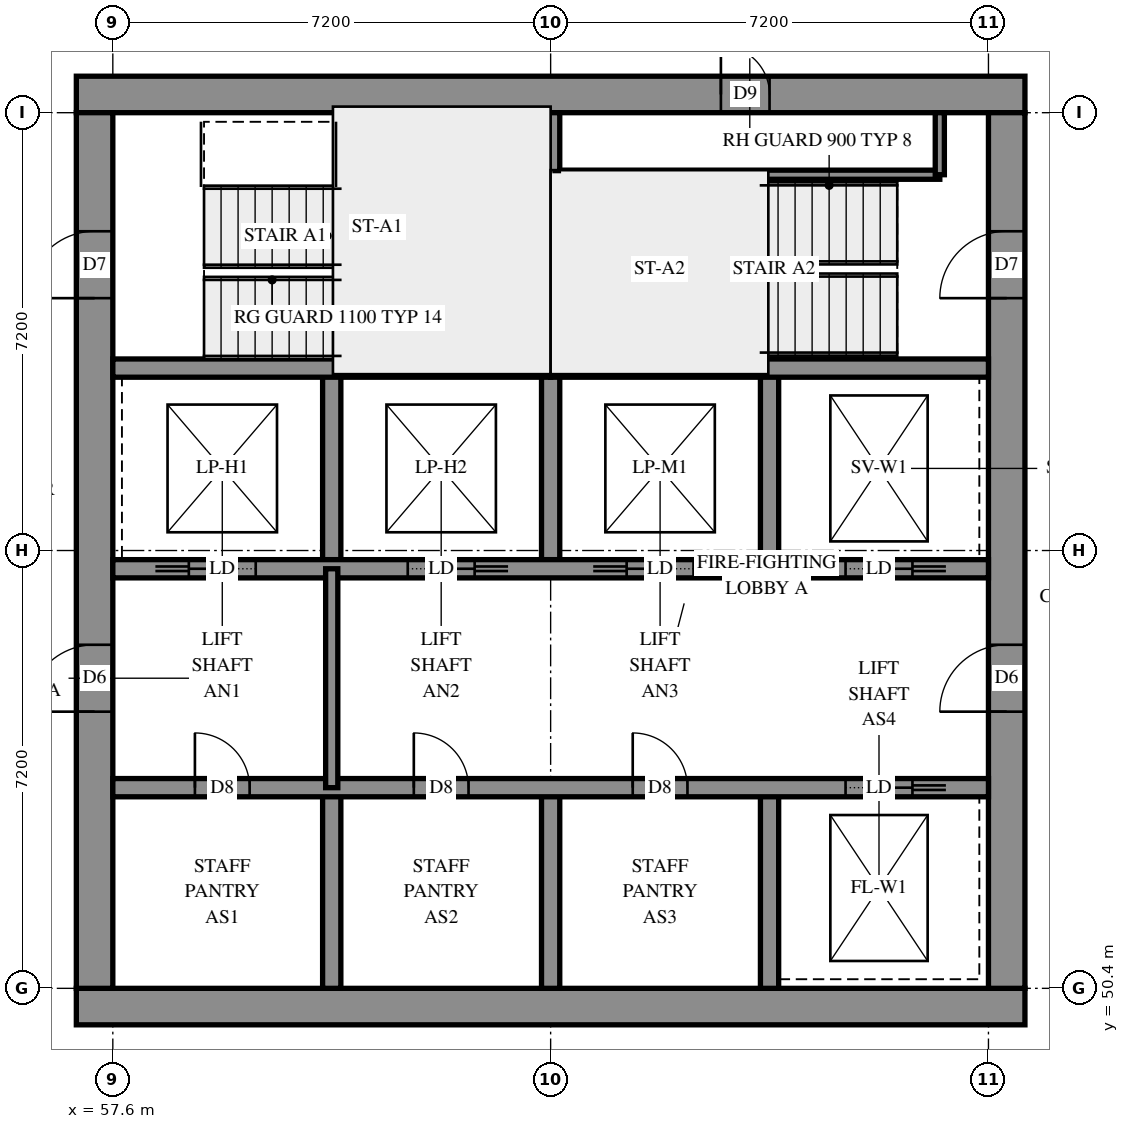
"""IFC4 building model, lengths in metres.
Left out: names, types, materials, properties, quantities, classifications, styles, units other than length and angle.
Written with IfcOpenShell. Run it as: python <this file> out.ifc"""

import sys

from ifc_helpers import new_model, si_unit, direction, frame, frame_2d, origin, place, context, subcontext, project, spatial, rectangle, extrude, element, fill, save


model = new_model("IFC4")
c1 = context("Model", 3, precision=1e-05, world=origin(), true_north=direction((0.0, 1.0)))
c2 = subcontext(c1, "Body", "Model", "MODEL_VIEW")
j1 = project(units=[si_unit("LENGTHUNIT", "METRE"), si_unit("PLANEANGLEUNIT", "RADIAN")], contexts=[c1])
p1 = place(None, origin())
s1 = spatial("IfcSite", under=j1, at=p1, CompositionType="ELEMENT")
p2 = place(p1, origin())
s2 = spatial("IfcBuilding", under=s1, at=p2, CompositionType="ELEMENT")
p3 = place(p2, frame((0.0, 0.0, 162.6)))
s3 = spatial("IfcBuildingStorey", under=s2, at=p3, CompositionType="ELEMENT", Elevation=162.6)
p4 = place(p3, frame((57.0, 50.1, -0.3), z_axis=(0.0, 0.0, 1.0), x_axis=(1.0, 0.0, 0.0)))
e1 = element("IfcWall", 1, at=p4, inside=s3, PredefinedType="SHEAR", context=c2, shape_type="SweptSolid", body=[
    extrude(rectangle(XDim=15.6, YDim=0.6, at=frame_2d((7.8, 0.0))), origin(), (0.0, 0.0, 1.0), 2.7),
])
p5 = place(p3, frame((57.0, 65.1, -0.3), z_axis=(0.0, 0.0, 1.0), x_axis=(1.0, 0.0, 0.0)))
e2 = element("IfcWall", 2, at=p5, inside=s3, PredefinedType="SHEAR", context=c2, shape_type="SweptSolid", body=[
    extrude(rectangle(XDim=15.6, YDim=0.6, at=frame_2d((7.8, 0.0))), origin(), (0.0, 0.0, 1.0), 2.7),
])
p6 = place(p5, frame((10.6, 0.0, 0.3)))
e3 = element("IfcOpeningElement", 3, at=p6, cuts=e2, PredefinedType="OPENING", context=c2, shape_type="SweptSolid", body=[
    extrude(rectangle(XDim=0.8, YDim=2.1, at=frame_2d((0.4, 1.05))), frame((0.0, 0.31, 0.0), z_axis=(0.0, -1.0, 0.0), x_axis=(1.0, 0.0, 0.0)), (0.0, 0.0, 1.0), 0.62),
])
p7 = place(p3, frame((57.3, 50.4, -0.3), z_axis=(0.0, 0.0, 1.0), x_axis=(0.0, 1.0, 0.0)))
e4 = element("IfcWall", 4, at=p7, inside=s3, PredefinedType="SHEAR", context=c2, shape_type="SweptSolid", body=[
    extrude(rectangle(XDim=14.4, YDim=0.6, at=frame_2d((7.2, 0.0))), origin(), (0.0, 0.0, 1.0), 2.7),
])
p8 = place(p7, frame((4.55, 0.0, 0.3)))
e5 = element("IfcOpeningElement", 5, at=p8, cuts=e4, PredefinedType="OPENING", context=c2, shape_type="SweptSolid", body=[
    extrude(rectangle(XDim=1.1, YDim=2.1, at=frame_2d((0.55, 1.05))), frame((0.0, 0.31, 0.0), z_axis=(0.0, -1.0, 0.0), x_axis=(1.0, 0.0, 0.0)), (0.0, 0.0, 1.0), 0.62),
])
p9 = place(p7, frame((11.35, 0.0, 0.3)))
e6 = element("IfcOpeningElement", 6, at=p9, cuts=e4, PredefinedType="OPENING", context=c2, shape_type="SweptSolid", body=[
    extrude(rectangle(XDim=1.1, YDim=2.1, at=frame_2d((0.55, 1.05))), frame((0.0, 0.31, 0.0), z_axis=(0.0, -1.0, 0.0), x_axis=(1.0, 0.0, 0.0)), (0.0, 0.0, 1.0), 0.62),
])
p10 = place(p3, frame((72.3, 50.4, -0.3), z_axis=(0.0, 0.0, 1.0), x_axis=(0.0, 1.0, 0.0)))
e7 = element("IfcWall", 7, at=p10, inside=s3, PredefinedType="SHEAR", context=c2, shape_type="SweptSolid", body=[
    extrude(rectangle(XDim=14.4, YDim=0.6, at=frame_2d((7.2, 0.0))), origin(), (0.0, 0.0, 1.0), 2.7),
])
p11 = place(p10, frame((4.55, 0.0, 0.3)))
e8 = element("IfcOpeningElement", 8, at=p11, cuts=e7, PredefinedType="OPENING", context=c2, shape_type="SweptSolid", body=[
    extrude(rectangle(XDim=1.1, YDim=2.1, at=frame_2d((0.55, 1.05))), frame((0.0, 0.31, 0.0), z_axis=(0.0, -1.0, 0.0), x_axis=(1.0, 0.0, 0.0)), (0.0, 0.0, 1.0), 0.62),
])
p12 = place(p10, frame((11.35, 0.0, 0.3)))
e9 = element("IfcOpeningElement", 9, at=p12, cuts=e7, PredefinedType="OPENING", context=c2, shape_type="SweptSolid", body=[
    extrude(rectangle(XDim=1.1, YDim=2.1, at=frame_2d((0.55, 1.05))), frame((0.0, 0.31, 0.0), z_axis=(0.0, -1.0, 0.0), x_axis=(1.0, 0.0, 0.0)), (0.0, 0.0, 1.0), 0.62),
])
for number, where, z_axis, x_axis in (
    (10, (61.2, 50.4, 0.0), (0.0, 0.0, 1.0), (0.0, 1.0, 0.0)),
    (11, (61.2, 57.3, 0.0), (0.0, 0.0, 1.0), (0.0, 1.0, 0.0)),
    (12, (64.8, 50.4, 0.0), (0.0, 0.0, 1.0), (0.0, 1.0, 0.0)),
    (13, (64.8, 57.3, 0.0), (0.0, 0.0, 1.0), (0.0, 1.0, 0.0)),
    (14, (68.4, 50.4, 0.0), (0.0, 0.0, 1.0), (0.0, 1.0, 0.0)),
    (15, (68.4, 57.3, 0.0), (0.0, 0.0, 1.0), (0.0, 1.0, 0.0)),
):
    element("IfcWall", number, at=place(p3, frame(where, z_axis=z_axis, x_axis=x_axis)), inside=s3, PredefinedType="SOLIDWALL", context=c2, shape_type="SweptSolid", body=[
        extrude(rectangle(XDim=3.3, YDim=0.3, at=frame_2d((1.65, 0.0))), origin(), (0.0, 0.0, 1.0), 3.1),
    ])
p13 = place(p3, frame((57.6, 53.7, 0.0), z_axis=(0.0, 0.0, 1.0), x_axis=(1.0, 0.0, 0.0)))
e16 = element("IfcWall", 16, at=p13, inside=s3, PredefinedType="SOLIDWALL", context=c2, shape_type="SweptSolid", body=[
    extrude(rectangle(XDim=14.4, YDim=0.3, at=frame_2d((7.2, 0.0))), origin(), (0.0, 0.0, 1.0), 3.1),
])
p14 = place(p13, frame((1.35, 0.0, 0.0)))
e17 = element("IfcOpeningElement", 17, at=p14, cuts=e16, PredefinedType="OPENING", context=c2, shape_type="SweptSolid", body=[
    extrude(rectangle(XDim=0.9, YDim=2.1, at=frame_2d((0.45, 1.05))), frame((0.0, 0.16, 0.0), z_axis=(0.0, -1.0, 0.0), x_axis=(1.0, 0.0, 0.0)), (0.0, 0.0, 1.0), 0.32),
])
p15 = place(p13, frame((4.95, 0.0, 0.0)))
e18 = element("IfcOpeningElement", 18, at=p15, cuts=e16, PredefinedType="OPENING", context=c2, shape_type="SweptSolid", body=[
    extrude(rectangle(XDim=0.9, YDim=2.1, at=frame_2d((0.45, 1.05))), frame((0.0, 0.16, 0.0), z_axis=(0.0, -1.0, 0.0), x_axis=(1.0, 0.0, 0.0)), (0.0, 0.0, 1.0), 0.32),
])
p16 = place(p13, frame((8.55, 0.0, 0.0)))
e19 = element("IfcOpeningElement", 19, at=p16, cuts=e16, PredefinedType="OPENING", context=c2, shape_type="SweptSolid", body=[
    extrude(rectangle(XDim=0.9, YDim=2.1, at=frame_2d((0.45, 1.05))), frame((0.0, 0.16, 0.0), z_axis=(0.0, -1.0, 0.0), x_axis=(1.0, 0.0, 0.0)), (0.0, 0.0, 1.0), 0.32),
])
p17 = place(p13, frame((12.05, 0.0, 0.0)))
e20 = element("IfcOpeningElement", 20, at=p17, cuts=e16, PredefinedType="OPENING", context=c2, shape_type="SweptSolid", body=[
    extrude(rectangle(XDim=1.1, YDim=2.1, at=frame_2d((0.55, 1.05))), frame((0.0, 0.16, 0.0), z_axis=(0.0, -1.0, 0.0), x_axis=(1.0, 0.0, 0.0)), (0.0, 0.0, 1.0), 0.32),
])
p18 = place(p3, frame((57.6, 57.3, 0.0), z_axis=(0.0, 0.0, 1.0), x_axis=(1.0, 0.0, 0.0)))
e21 = element("IfcWall", 21, at=p18, inside=s3, PredefinedType="SOLIDWALL", context=c2, shape_type="SweptSolid", body=[
    extrude(rectangle(XDim=14.4, YDim=0.3, at=frame_2d((7.2, 0.0))), origin(), (0.0, 0.0, 1.0), 3.1),
])
p19 = place(p18, frame((1.25, 0.0, 0.0)))
e22 = element("IfcOpeningElement", 22, at=p19, cuts=e21, PredefinedType="OPENING", context=c2, shape_type="SweptSolid", body=[
    extrude(rectangle(XDim=1.1, YDim=2.1, at=frame_2d((0.55, 1.05))), frame((0.0, 0.16, 0.0), z_axis=(0.0, -1.0, 0.0), x_axis=(1.0, 0.0, 0.0)), (0.0, 0.0, 1.0), 0.32),
])
p20 = place(p18, frame((4.85, 0.0, 0.0)))
e23 = element("IfcOpeningElement", 23, at=p20, cuts=e21, PredefinedType="OPENING", context=c2, shape_type="SweptSolid", body=[
    extrude(rectangle(XDim=1.1, YDim=2.1, at=frame_2d((0.55, 1.05))), frame((0.0, 0.16, 0.0), z_axis=(0.0, -1.0, 0.0), x_axis=(1.0, 0.0, 0.0)), (0.0, 0.0, 1.0), 0.32),
])
p21 = place(p18, frame((8.45, 0.0, 0.0)))
e24 = element("IfcOpeningElement", 24, at=p21, cuts=e21, PredefinedType="OPENING", context=c2, shape_type="SweptSolid", body=[
    extrude(rectangle(XDim=1.1, YDim=2.1, at=frame_2d((0.55, 1.05))), frame((0.0, 0.16, 0.0), z_axis=(0.0, -1.0, 0.0), x_axis=(1.0, 0.0, 0.0)), (0.0, 0.0, 1.0), 0.32),
])
p22 = place(p18, frame((12.05, 0.0, 0.0)))
e25 = element("IfcOpeningElement", 25, at=p22, cuts=e21, PredefinedType="OPENING", context=c2, shape_type="SweptSolid", body=[
    extrude(rectangle(XDim=1.1, YDim=2.1, at=frame_2d((0.55, 1.05))), frame((0.0, 0.16, 0.0), z_axis=(0.0, -1.0, 0.0), x_axis=(1.0, 0.0, 0.0)), (0.0, 0.0, 1.0), 0.32),
])
for number, where, z_axis, x_axis in (
    (26, (57.6, 60.6, 0.0), (0.0, 0.0, 1.0), (1.0, 0.0, 0.0)),
    (27, (64.8, 60.6, 0.0), (0.0, 0.0, 1.0), (1.0, 0.0, 0.0)),
):
    element("IfcWall", number, at=place(p3, frame(where, z_axis=z_axis, x_axis=x_axis)), inside=s3, PredefinedType="SOLIDWALL", context=c2, shape_type="SweptSolid", body=[
        extrude(rectangle(XDim=7.2, YDim=0.3, at=frame_2d((3.6, 0.0))), origin(), (0.0, 0.0, 1.0), 3.1),
    ])
p23 = place(p3, frame((64.8, 60.6, 0.0), z_axis=(0.0, 0.0, 1.0), x_axis=(0.0, 1.0, 0.0)))
e28 = element("IfcWall", 28, at=p23, inside=s3, PredefinedType="SOLIDWALL", context=c2, shape_type="SweptSolid", body=[
    extrude(rectangle(XDim=4.2, YDim=0.3, at=frame_2d((2.1, 0.0))), origin(), (0.0, 0.0, 1.0), 3.1),
])
p24 = place(p3, frame((64.95, 63.78, 0.0), z_axis=(0.0, 0.0, 1.0), x_axis=(1.0, 0.0, 0.0)))
e29 = element("IfcWall", 29, at=p24, inside=s3, PredefinedType="PARTITIONING", context=c2, shape_type="SweptSolid", body=[
    extrude(rectangle(XDim=6.25, YDim=0.15, at=frame_2d((3.125, 0.0))), origin(), (0.0, 0.0, 1.0), 3.1),
])
p25 = place(p3, frame((71.2, 63.78, 0.0), z_axis=(0.0, 0.0, 1.0), x_axis=(0.0, 1.0, 0.0)))
e30 = element("IfcWall", 30, at=p25, inside=s3, PredefinedType="PARTITIONING", context=c2, shape_type="SweptSolid", body=[
    extrude(rectangle(XDim=1.02, YDim=0.15, at=frame_2d((0.51, 0.0))), origin(), (0.0, 0.0, 1.0), 3.1),
])
p26 = place(p3, frame((61.2, 53.7, 0.0), z_axis=(0.0, 0.0, 1.0), x_axis=(0.0, 1.0, 0.0)))
e31 = element("IfcWall", 31, at=p26, inside=s3, PredefinedType="PARTITIONING", context=c2, shape_type="SweptSolid", body=[
    extrude(rectangle(XDim=3.6, YDim=0.2, at=frame_2d((1.8, 0.0))), origin(), (0.0, 0.0, 1.0), 3.1),
])
p27 = place(p6, origin())
e32 = element("IfcDoor", 32, at=p27, inside=s3, OperationType="SINGLE_SWING_RIGHT", PredefinedType="DOOR", context=c2, shape_type="SweptSolid", body=[
    extrude(rectangle(XDim=0.8, YDim=2.1, at=frame_2d((0.4, 1.05))), frame((0.0, 0.025, 0.0), z_axis=(0.0, -1.0, 0.0), x_axis=(1.0, 0.0, 0.0)), (0.0, 0.0, 1.0), 0.05),
])
fill(e3, e32)
p28 = place(p8, origin())
e33 = element("IfcDoor", 33, at=p28, inside=s3, OperationType="DOUBLE_DOOR_SINGLE_SWING", PredefinedType="DOOR", context=c2, shape_type="SweptSolid", body=[
    extrude(rectangle(XDim=1.1, YDim=2.1, at=frame_2d((0.55, 1.05))), frame((0.0, 0.025, 0.0), z_axis=(0.0, -1.0, 0.0), x_axis=(1.0, 0.0, 0.0)), (0.0, 0.0, 1.0), 0.05),
])
fill(e5, e33)
p29 = place(p11, origin())
e34 = element("IfcDoor", 34, at=p29, inside=s3, OperationType="DOUBLE_DOOR_SINGLE_SWING", PredefinedType="DOOR", context=c2, shape_type="SweptSolid", body=[
    extrude(rectangle(XDim=1.1, YDim=2.1, at=frame_2d((0.55, 1.05))), frame((0.0, 0.025, 0.0), z_axis=(0.0, -1.0, 0.0), x_axis=(1.0, 0.0, 0.0)), (0.0, 0.0, 1.0), 0.05),
])
fill(e8, e34)
p30 = place(p9, origin())
e35 = element("IfcDoor", 35, at=p30, inside=s3, OperationType="SINGLE_SWING_LEFT", PredefinedType="DOOR", context=c2, shape_type="SweptSolid", body=[
    extrude(rectangle(XDim=1.1, YDim=2.1, at=frame_2d((0.55, 1.05))), frame((0.0, 0.025, 0.0), z_axis=(0.0, -1.0, 0.0), x_axis=(1.0, 0.0, 0.0)), (0.0, 0.0, 1.0), 0.05),
])
fill(e6, e35)
p31 = place(p12, origin())
e36 = element("IfcDoor", 36, at=p31, inside=s3, OperationType="SINGLE_SWING_RIGHT", PredefinedType="DOOR", context=c2, shape_type="SweptSolid", body=[
    extrude(rectangle(XDim=1.1, YDim=2.1, at=frame_2d((0.55, 1.05))), frame((0.0, 0.025, 0.0), z_axis=(0.0, -1.0, 0.0), x_axis=(1.0, 0.0, 0.0)), (0.0, 0.0, 1.0), 0.05),
])
fill(e9, e36)
p32 = place(p14, origin())
e37 = element("IfcDoor", 37, at=p32, inside=s3, OperationType="SINGLE_SWING_LEFT", PredefinedType="DOOR", context=c2, shape_type="SweptSolid", body=[
    extrude(rectangle(XDim=0.9, YDim=2.1, at=frame_2d((0.45, 1.05))), frame((0.0, 0.025, 0.0), z_axis=(0.0, -1.0, 0.0), x_axis=(1.0, 0.0, 0.0)), (0.0, 0.0, 1.0), 0.05),
])
fill(e17, e37)
p33 = place(p15, origin())
e38 = element("IfcDoor", 38, at=p33, inside=s3, OperationType="SINGLE_SWING_LEFT", PredefinedType="DOOR", context=c2, shape_type="SweptSolid", body=[
    extrude(rectangle(XDim=0.9, YDim=2.1, at=frame_2d((0.45, 1.05))), frame((0.0, 0.025, 0.0), z_axis=(0.0, -1.0, 0.0), x_axis=(1.0, 0.0, 0.0)), (0.0, 0.0, 1.0), 0.05),
])
fill(e18, e38)
p34 = place(p16, origin())
e39 = element("IfcDoor", 39, at=p34, inside=s3, OperationType="SINGLE_SWING_LEFT", PredefinedType="DOOR", context=c2, shape_type="SweptSolid", body=[
    extrude(rectangle(XDim=0.9, YDim=2.1, at=frame_2d((0.45, 1.05))), frame((0.0, 0.025, 0.0), z_axis=(0.0, -1.0, 0.0), x_axis=(1.0, 0.0, 0.0)), (0.0, 0.0, 1.0), 0.05),
])
fill(e19, e39)
p35 = place(p17, origin())
e40 = element("IfcDoor", 40, at=p35, inside=s3, OperationType="SLIDING_TO_RIGHT", PredefinedType="DOOR", context=c2, shape_type="SweptSolid", body=[
    extrude(rectangle(XDim=1.1, YDim=2.1, at=frame_2d((0.55, 1.05))), frame((0.0, 0.025, 0.0), z_axis=(0.0, -1.0, 0.0), x_axis=(1.0, 0.0, 0.0)), (0.0, 0.0, 1.0), 0.05),
])
fill(e20, e40)
p36 = place(p19, origin())
e41 = element("IfcDoor", 41, at=p36, inside=s3, OperationType="SLIDING_TO_LEFT", PredefinedType="DOOR", context=c2, shape_type="SweptSolid", body=[
    extrude(rectangle(XDim=1.1, YDim=2.1, at=frame_2d((0.55, 1.05))), frame((0.0, 0.025, 0.0), z_axis=(0.0, -1.0, 0.0), x_axis=(1.0, 0.0, 0.0)), (0.0, 0.0, 1.0), 0.05),
])
fill(e22, e41)
p37 = place(p20, origin())
e42 = element("IfcDoor", 42, at=p37, inside=s3, OperationType="SLIDING_TO_RIGHT", PredefinedType="DOOR", context=c2, shape_type="SweptSolid", body=[
    extrude(rectangle(XDim=1.1, YDim=2.1, at=frame_2d((0.55, 1.05))), frame((0.0, 0.025, 0.0), z_axis=(0.0, -1.0, 0.0), x_axis=(1.0, 0.0, 0.0)), (0.0, 0.0, 1.0), 0.05),
])
fill(e23, e42)
p38 = place(p21, origin())
e43 = element("IfcDoor", 43, at=p38, inside=s3, OperationType="SLIDING_TO_LEFT", PredefinedType="DOOR", context=c2, shape_type="SweptSolid", body=[
    extrude(rectangle(XDim=1.1, YDim=2.1, at=frame_2d((0.55, 1.05))), frame((0.0, 0.025, 0.0), z_axis=(0.0, -1.0, 0.0), x_axis=(1.0, 0.0, 0.0)), (0.0, 0.0, 1.0), 0.05),
])
fill(e24, e43)
p39 = place(p22, origin())
e44 = element("IfcDoor", 44, at=p39, inside=s3, OperationType="SLIDING_TO_RIGHT", PredefinedType="DOOR", context=c2, shape_type="SweptSolid", body=[
    extrude(rectangle(XDim=1.1, YDim=2.1, at=frame_2d((0.55, 1.05))), frame((0.0, 0.025, 0.0), z_axis=(0.0, -1.0, 0.0), x_axis=(1.0, 0.0, 0.0)), (0.0, 0.0, 1.0), 0.05),
])
fill(e25, e44)
save(model, sys.argv[1])
